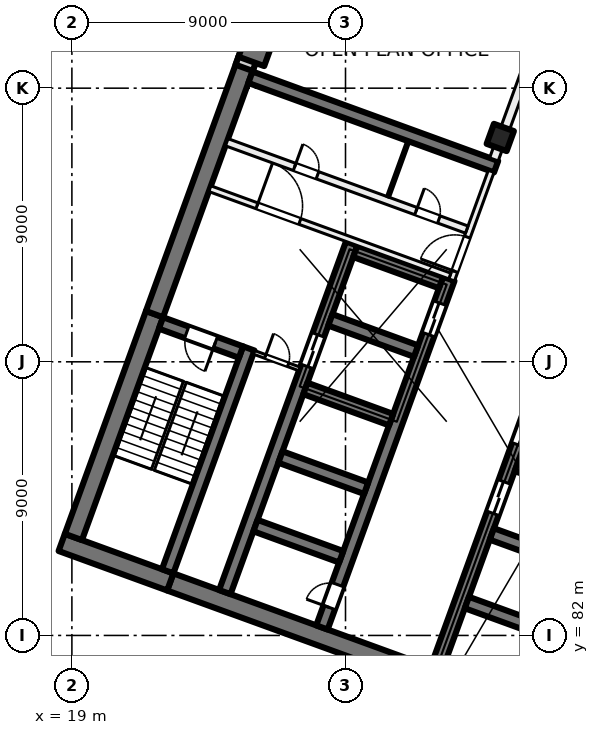
"""IFC4 building model, lengths in metres.
Left out: names, types, materials, properties, quantities, classifications, styles, units other than length and angle.
Written with IfcOpenShell. Run it as: python <this file> out.ifc"""

import sys

from ifc_helpers import new_model, si_unit, direction, frame, frame_2d, origin, origin_2d, place, context, subcontext, project, spatial, rectangle, extrude, element, fill, save


model = new_model("IFC4")
c1 = context("Model", 3, precision=1e-05, world=origin(), true_north=direction((0.0, 1.0)))
c2 = subcontext(c1, "Body", "Model", "MODEL_VIEW")
j1 = project(units=[si_unit("LENGTHUNIT", "METRE"), si_unit("PLANEANGLEUNIT", "RADIAN")], contexts=[c1])
p1 = place(None, origin())
s1 = spatial("IfcSite", under=j1, at=p1, CompositionType="ELEMENT")
p2 = place(p1, origin())
s2 = spatial("IfcBuilding", under=s1, at=p2, CompositionType="ELEMENT")
p3 = place(p2, frame((0.0, 0.0, 43.5)))
s3 = spatial("IfcBuildingStorey", under=s2, at=p3, CompositionType="ELEMENT", Elevation=43.5)
p4 = place(p3, frame((33.091, 98.379, 0.0), z_axis=(0.0, 0.0, 1.0), x_axis=(-0.342020143326, -0.939692620786, 0.0)))
e1 = element("IfcColumn", 1, at=p4, inside=s3, PredefinedType="COLUMN", context=c2, shape_type="SweptSolid", body=[
    extrude(rectangle(XDim=0.7, YDim=0.7, at=origin_2d()), origin(), (0.0, 0.0, 1.0), 4.0),
])
p5 = place(p3, frame((25.056, 101.303, 0.0), z_axis=(0.0, 0.0, 1.0), x_axis=(-0.342020143326, -0.939692620786, 0.0)))
e2 = element("IfcColumn", 2, at=p5, inside=s3, PredefinedType="COLUMN", context=c2, shape_type="SweptSolid", body=[
    extrude(rectangle(XDim=0.9, YDim=0.9, at=origin_2d()), origin(), (0.0, 0.0, 1.0), 4.0),
])
p6 = place(p3, frame((35.767, 78.835, 0.0), z_axis=(0.0, 0.0, 1.0), x_axis=(-0.939692894512, 0.342019391267, 0.0)))
e3 = element("IfcWall", 3, at=p6, inside=s3, PredefinedType="SHEAR", context=c2, shape_type="SweptSolid", body=[
    extrude(rectangle(XDim=14.4, YDim=0.6, at=frame_2d((7.2, 0.0))), origin(), (0.0, 0.0, 1.0), 4.0),
])
p7 = place(p3, frame((22.236, 83.76, 0.0), z_axis=(0.0, 0.0, 1.0), x_axis=(-0.939680822529, 0.342052557032, 0.0)))
e4 = element("IfcWall", 4, at=p7, inside=s3, PredefinedType="SHEAR", context=c2, shape_type="SweptSolid", body=[
    extrude(rectangle(XDim=3.8, YDim=0.6, at=frame_2d((1.9, 0.0))), origin(), (0.0, 0.0, 1.0), 4.0),
])
p8 = place(p3, frame((19.05, 85.239, 0.0), z_axis=(0.0, 0.0, 1.0), x_axis=(0.342016982193, 0.939693771338, 0.0)))
e5 = element("IfcWall", 5, at=p8, inside=s3, PredefinedType="SHEAR", context=c2, shape_type="SweptSolid", body=[
    extrude(rectangle(XDim=7.8, YDim=0.6, at=frame_2d((3.9, 0.0))), origin(), (0.0, 0.0, 1.0), 4.0),
])
p9 = place(p3, frame((21.717, 92.568, 0.0), z_axis=(0.0, 0.0, 1.0), x_axis=(0.342016162452, 0.939694069696, 0.0)))
e6 = element("IfcWall", 6, at=p9, inside=s3, PredefinedType="SHEAR", context=c2, shape_type="SweptSolid", body=[
    extrude(rectangle(XDim=8.9, YDim=0.6, at=frame_2d((4.45, 0.0))), origin(), (0.0, 0.0, 1.0), 4.0),
])
p10 = place(p3, frame((22.15, 84.11, 0.0), z_axis=(0.0, 0.0, 1.0), x_axis=(0.342016982193, 0.939693771338, 0.0)))
e7 = element("IfcWall", 7, at=p10, inside=s3, PredefinedType="SHEAR", context=c2, shape_type="SweptSolid", body=[
    extrude(rectangle(XDim=7.8, YDim=0.4, at=frame_2d((3.9, 0.0))), origin(), (0.0, 0.0, 1.0), 4.0),
])
p11 = place(p3, frame((24.562, 91.32, 0.0), z_axis=(0.0, 0.0, 1.0), x_axis=(-0.939717030584, 0.341953070509, 0.0)))
e8 = element("IfcWall", 8, at=p11, inside=s3, PredefinedType="SHEAR", context=c2, shape_type="SweptSolid", body=[
    extrude(rectangle(XDim=2.8, YDim=0.4, at=frame_2d((1.4, 0.0))), origin(), (0.0, 0.0, 1.0), 4.0),
])
p12 = place(p11, frame((0.9, 0.0, 0.0)))
e9 = element("IfcOpeningElement", 9, at=p12, cuts=e8, PredefinedType="OPENING", context=c2, shape_type="SweptSolid", body=[
    extrude(rectangle(XDim=1.0, YDim=2.1, at=frame_2d((0.5, 1.05))), frame((0.0, 0.21, 0.0), z_axis=(0.0, -1.0, 0.0), x_axis=(1.0, 0.0, 0.0)), (0.0, 0.0, 1.0), 0.42),
])
p13 = place(p3, frame((30.984, 80.895, 0.0), z_axis=(0.0, 0.0, 1.0), x_axis=(0.342021021735, 0.939692301071, 0.0)))
e10 = element("IfcWall", 10, at=p13, inside=s3, PredefinedType="SHEAR", context=c2, shape_type="SweptSolid", body=[
    extrude(rectangle(XDim=12.2, YDim=0.4, at=frame_2d((6.1, 0.0))), origin(), (0.0, 0.0, 1.0), 4.0),
])
p14 = place(p13, frame((5.45, 0.0, 0.0)))
e11 = element("IfcOpeningElement", 11, at=p14, cuts=e10, PredefinedType="OPENING", context=c2, shape_type="SweptSolid", body=[
    extrude(rectangle(XDim=1.1, YDim=2.1, at=frame_2d((0.55, 1.05))), frame((0.0, 0.21, 0.0), z_axis=(0.0, -1.0, 0.0), x_axis=(1.0, 0.0, 0.0)), (0.0, 0.0, 1.0), 0.42),
])
p15 = place(p13, frame((7.85, 0.0, 0.0)))
e12 = element("IfcOpeningElement", 12, at=p15, cuts=e10, PredefinedType="OPENING", context=c2, shape_type="SweptSolid", body=[
    extrude(rectangle(XDim=1.1, YDim=2.1, at=frame_2d((0.55, 1.05))), frame((0.0, 0.21, 0.0), z_axis=(0.0, -1.0, 0.0), x_axis=(1.0, 0.0, 0.0)), (0.0, 0.0, 1.0), 0.42),
])
p16 = place(p13, frame((10.25, 0.0, 0.0)))
e13 = element("IfcOpeningElement", 13, at=p16, cuts=e10, PredefinedType="OPENING", context=c2, shape_type="SweptSolid", body=[
    extrude(rectangle(XDim=1.1, YDim=2.1, at=frame_2d((0.55, 1.05))), frame((0.0, 0.21, 0.0), z_axis=(0.0, -1.0, 0.0), x_axis=(1.0, 0.0, 0.0)), (0.0, 0.0, 1.0), 0.42),
])
for number, where, z_axis, x_axis in (
    (14, (34.812, 82.056, 0.0), (0.0, 0.0, 1.0), (-0.94, 0.342, 0.0)),
    (15, (35.632, 84.311, 0.0), (0.0, 0.0, 1.0), (-0.94, 0.342, 0.0)),
    (16, (36.453, 86.566, 0.0), (0.0, 0.0, 1.0), (-0.94, 0.342, 0.0)),
):
    element("IfcWall", number, at=place(p3, frame(where, z_axis=z_axis, x_axis=x_axis)), inside=s3, PredefinedType="SHEAR", context=c2, shape_type="SweptSolid", body=[
        extrude(rectangle(XDim=3.0, YDim=0.4, at=frame_2d((1.5, 0.0))), origin(), (0.0, 0.0, 1.0), 4.0),
    ])
p17 = place(p3, frame((27.225, 82.263, 0.0), z_axis=(0.0, 0.0, 1.0), x_axis=(0.342014590177, 0.939694641948, 0.0)))
e17 = element("IfcWall", 17, at=p17, inside=s3, PredefinedType="SHEAR", context=c2, shape_type="SweptSolid", body=[
    extrude(rectangle(XDim=12.2, YDim=0.4, at=frame_2d((6.1, 0.0))), origin(), (0.0, 0.0, 1.0), 4.0),
])
p18 = place(p17, frame((10.25, 0.0, 0.0)))
e18 = element("IfcOpeningElement", 18, at=p18, cuts=e17, PredefinedType="OPENING", context=c2, shape_type="SweptSolid", body=[
    extrude(rectangle(XDim=1.1, YDim=2.1, at=frame_2d((0.55, 1.05))), frame((0.0, 0.21, 0.0), z_axis=(0.0, -1.0, 0.0), x_axis=(1.0, 0.0, 0.0)), (0.0, 0.0, 1.0), 0.42),
])
p19 = place(p17, frame((0.7, 0.0, 0.0)))
e19 = element("IfcOpeningElement", 19, at=p19, cuts=e17, PredefinedType="OPENING", context=c2, shape_type="SweptSolid", body=[
    extrude(rectangle(XDim=0.8, YDim=2.1, at=frame_2d((0.4, 1.05))), frame((0.0, 0.21, 0.0), z_axis=(0.0, -1.0, 0.0), x_axis=(1.0, 0.0, 0.0)), (0.0, 0.0, 1.0), 0.42),
])
p20 = place(p3, frame((24.03, 83.426, 0.0), z_axis=(0.0, 0.0, 1.0), x_axis=(0.342014590177, 0.939694641948, 0.0)))
e20 = element("IfcWall", 20, at=p20, inside=s3, PredefinedType="SHEAR", context=c2, shape_type="SweptSolid", body=[
    extrude(rectangle(XDim=12.2, YDim=0.4, at=frame_2d((6.1, 0.0))), origin(), (0.0, 0.0, 1.0), 4.0),
])
p21 = place(p20, frame((7.9, 0.0, 0.0)))
e21 = element("IfcOpeningElement", 21, at=p21, cuts=e20, PredefinedType="OPENING", context=c2, shape_type="SweptSolid", body=[
    extrude(rectangle(XDim=1.1, YDim=2.1, at=frame_2d((0.55, 1.05))), frame((0.0, 0.21, 0.0), z_axis=(0.0, -1.0, 0.0), x_axis=(1.0, 0.0, 0.0)), (0.0, 0.0, 1.0), 0.42),
])
p22 = place(p3, frame((27.858, 84.587, 0.0), z_axis=(0.0, 0.0, 1.0), x_axis=(-0.939686455819, 0.342037080957, 0.0)))
e22 = element("IfcWall", 22, at=p22, inside=s3, PredefinedType="SHEAR", context=c2, shape_type="SweptSolid", body=[
    extrude(rectangle(XDim=3.0, YDim=0.4, at=frame_2d((1.5, 0.0))), origin(), (0.0, 0.0, 1.0), 4.0),
])
p23 = place(p3, frame((28.678, 86.842, 0.0), z_axis=(0.0, 0.0, 1.0), x_axis=(-0.939676934218, 0.342063238742, 0.0)))
e23 = element("IfcWall", 23, at=p23, inside=s3, PredefinedType="SHEAR", context=c2, shape_type="SweptSolid", body=[
    extrude(rectangle(XDim=3.0, YDim=0.4, at=frame_2d((1.5, 0.0))), origin(), (0.0, 0.0, 1.0), 4.0),
])
for number, where, z_axis, x_axis in (
    (24, (29.5, 89.097, 0.0), (0.0, 0.0, 1.0), (-0.94, 0.342, 0.0)),
    (25, (30.32, 91.353, 0.0), (0.0, 0.0, 1.0), (-0.94, 0.342, 0.0)),
    (26, (31.141, 93.608, 0.0), (0.0, 0.0, 1.0), (-0.94, 0.342, 0.0)),
):
    element("IfcWall", number, at=place(p3, frame(where, z_axis=z_axis, x_axis=x_axis)), inside=s3, PredefinedType="SHEAR", context=c2, shape_type="SweptSolid", body=[
        extrude(rectangle(XDim=3.0, YDim=0.4, at=frame_2d((1.5, 0.0))), origin(), (0.0, 0.0, 1.0), 4.0),
    ])
p24 = place(p3, frame((32.953, 97.418, 0.0), z_axis=(0.0, 0.0, 1.0), x_axis=(-0.93969060187, 0.342025690201, 0.0)))
e27 = element("IfcWall", 27, at=p24, inside=s3, PredefinedType="SHEAR", context=c2, shape_type="SweptSolid", body=[
    extrude(rectangle(XDim=8.6, YDim=0.4, at=frame_2d((4.3, 0.0))), origin(), (0.0, 0.0, 1.0), 4.0),
])
p25 = place(p3, frame((24.666, 100.669, 0.0), z_axis=(0.0, 0.0, 1.0), x_axis=(0.34201964167, 0.939692803373, 0.0)))
e28 = element("IfcWall", 28, at=p25, inside=s3, PredefinedType="SOLIDWALL", context=c2, shape_type="SweptSolid", body=[
    extrude(rectangle(XDim=32.884, YDim=0.6, at=frame_2d((16.442, 0.0))), origin(), (0.0, 0.0, 1.0), 3.625),
])
p26 = place(p25, frame((1.48, 0.0, 0.9)))
e29 = element("IfcOpeningElement", 29, at=p26, cuts=e28, PredefinedType="OPENING", context=c2, shape_type="SweptSolid", body=[
    extrude(rectangle(XDim=3.0, YDim=2.4, at=frame_2d((1.5, 1.2))), frame((0.0, 0.31, 0.0), z_axis=(0.0, -1.0, 0.0), x_axis=(1.0, 0.0, 0.0)), (0.0, 0.0, 1.0), 0.62),
])
p27 = place(p25, frame((5.98, 0.0, 0.9)))
e30 = element("IfcOpeningElement", 30, at=p27, cuts=e28, PredefinedType="OPENING", context=c2, shape_type="SweptSolid", body=[
    extrude(rectangle(XDim=3.0, YDim=2.4, at=frame_2d((1.5, 1.2))), frame((0.0, 0.31, 0.0), z_axis=(0.0, -1.0, 0.0), x_axis=(1.0, 0.0, 0.0)), (0.0, 0.0, 1.0), 0.62),
])
p28 = place(p25, frame((10.48, 0.0, 0.9)))
e31 = element("IfcOpeningElement", 31, at=p28, cuts=e28, PredefinedType="OPENING", context=c2, shape_type="SweptSolid", body=[
    extrude(rectangle(XDim=3.0, YDim=2.4, at=frame_2d((1.5, 1.2))), frame((0.0, 0.31, 0.0), z_axis=(0.0, -1.0, 0.0), x_axis=(1.0, 0.0, 0.0)), (0.0, 0.0, 1.0), 0.62),
])
p29 = place(p25, frame((14.98, 0.0, 0.9)))
e32 = element("IfcOpeningElement", 32, at=p29, cuts=e28, PredefinedType="OPENING", context=c2, shape_type="SweptSolid", body=[
    extrude(rectangle(XDim=3.0, YDim=2.4, at=frame_2d((1.5, 1.2))), frame((0.0, 0.31, 0.0), z_axis=(0.0, -1.0, 0.0), x_axis=(1.0, 0.0, 0.0)), (0.0, 0.0, 1.0), 0.62),
])
p30 = place(p25, frame((20.08, 0.0, 0.0)))
e33 = element("IfcOpeningElement", 33, at=p30, cuts=e28, PredefinedType="OPENING", context=c2, shape_type="SweptSolid", body=[
    extrude(rectangle(XDim=1.8, YDim=2.4, at=frame_2d((0.9, 1.2))), frame((0.0, 0.31, 0.0), z_axis=(0.0, -1.0, 0.0), x_axis=(1.0, 0.0, 0.0)), (0.0, 0.0, 1.0), 0.62),
])
p31 = place(p25, frame((23.98, 0.0, 0.9)))
e34 = element("IfcOpeningElement", 34, at=p31, cuts=e28, PredefinedType="OPENING", context=c2, shape_type="SweptSolid", body=[
    extrude(rectangle(XDim=3.0, YDim=2.4, at=frame_2d((1.5, 1.2))), frame((0.0, 0.31, 0.0), z_axis=(0.0, -1.0, 0.0), x_axis=(1.0, 0.0, 0.0)), (0.0, 0.0, 1.0), 0.62),
])
p32 = place(p25, frame((28.48, 0.0, 0.9)))
e35 = element("IfcOpeningElement", 35, at=p32, cuts=e28, PredefinedType="OPENING", context=c2, shape_type="SweptSolid", body=[
    extrude(rectangle(XDim=3.0, YDim=2.4, at=frame_2d((1.5, 1.2))), frame((0.0, 0.31, 0.0), z_axis=(0.0, -1.0, 0.0), x_axis=(1.0, 0.0, 0.0)), (0.0, 0.0, 1.0), 0.62),
])
p33 = place(p3, frame((31.491, 93.693, 0.0), z_axis=(0.0, 0.0, 1.0), x_axis=(0.341995824804, 0.939701471648, 0.0)))
e36 = element("IfcWall", 36, at=p33, inside=s3, PredefinedType="PARTITIONING", context=c2, shape_type="SweptSolid", body=[
    extrude(rectangle(XDim=3.8, YDim=0.2, at=frame_2d((1.9, 0.0))), origin(), (0.0, 0.0, 1.0), 3.625),
])
p34 = place(p33, frame((0.3, 0.0, 0.0)))
e37 = element("IfcOpeningElement", 37, at=p34, cuts=e36, PredefinedType="OPENING", context=c2, shape_type="SweptSolid", body=[
    extrude(rectangle(XDim=1.2, YDim=2.1, at=frame_2d((0.6, 1.05))), frame((0.0, 0.11, 0.0), z_axis=(0.0, -1.0, 0.0), x_axis=(1.0, 0.0, 0.0)), (0.0, 0.0, 1.0), 0.22),
])
p35 = place(p3, frame((23.538, 96.694, 0.0), z_axis=(0.0, 0.0, 1.0), x_axis=(0.939691552312, -0.342023078919, 0.0)))
e38 = element("IfcWall", 38, at=p35, inside=s3, PredefinedType="PARTITIONING", context=c2, shape_type="SweptSolid", body=[
    extrude(rectangle(XDim=8.4, YDim=0.2, at=frame_2d((4.2, 0.0))), origin(), (0.0, 0.0, 1.0), 3.625),
])
p36 = place(p35, frame((1.65, 0.0, 0.0)))
e39 = element("IfcOpeningElement", 39, at=p36, cuts=e38, PredefinedType="OPENING", context=c2, shape_type="SweptSolid", body=[
    extrude(rectangle(XDim=1.5, YDim=2.1, at=frame_2d((0.75, 1.05))), frame((0.0, 0.11, 0.0), z_axis=(0.0, -1.0, 0.0), x_axis=(1.0, 0.0, 0.0)), (0.0, 0.0, 1.0), 0.22),
])
p37 = place(p3, frame((24.094, 98.221, 0.0), z_axis=(0.0, 0.0, 1.0), x_axis=(0.939691552312, -0.342023078919, 0.0)))
e40 = element("IfcWall", 40, at=p37, inside=s3, PredefinedType="PARTITIONING", context=c2, shape_type="SweptSolid", body=[
    extrude(rectangle(XDim=8.4, YDim=0.25, at=frame_2d((4.2, 0.0))), origin(), (0.0, 0.0, 1.0), 3.625),
])
p38 = place(p37, frame((6.625, 0.0, 0.0)))
e41 = element("IfcOpeningElement", 41, at=p38, cuts=e40, PredefinedType="OPENING", context=c2, shape_type="SweptSolid", body=[
    extrude(rectangle(XDim=0.8, YDim=2.1, at=frame_2d((0.4, 1.05))), frame((0.0, 0.135, 0.0), z_axis=(0.0, -1.0, 0.0), x_axis=(1.0, 0.0, 0.0)), (0.0, 0.0, 1.0), 0.27),
])
p39 = place(p37, frame((2.375, 0.0, 0.0)))
e42 = element("IfcOpeningElement", 42, at=p39, cuts=e40, PredefinedType="OPENING", context=c2, shape_type="SweptSolid", body=[
    extrude(rectangle(XDim=0.8, YDim=2.1, at=frame_2d((0.4, 1.05))), frame((0.0, 0.135, 0.0), z_axis=(0.0, -1.0, 0.0), x_axis=(1.0, 0.0, 0.0)), (0.0, 0.0, 1.0), 0.27),
])
p40 = place(p3, frame((24.985, 91.312, 0.0), z_axis=(0.0, 0.0, 1.0), x_axis=(0.939708740826, -0.341975850632, 0.0)))
e43 = element("IfcWall", 43, at=p40, inside=s3, PredefinedType="PARTITIONING", context=c2, shape_type="SweptSolid", body=[
    extrude(rectangle(XDim=1.6, YDim=0.125, at=frame_2d((0.8, 0.0))), origin(), (0.0, 0.0, 1.0), 3.625),
])
p41 = place(p40, frame((0.4, 0.0, 0.0)))
e44 = element("IfcOpeningElement", 44, at=p41, cuts=e43, PredefinedType="OPENING", context=c2, shape_type="SweptSolid", body=[
    extrude(rectangle(XDim=0.8, YDim=2.1, at=frame_2d((0.4, 1.05))), frame((0.0, 0.073, 0.0), z_axis=(0.0, -1.0, 0.0), x_axis=(1.0, 0.0, 0.0)), (0.0, 0.0, 1.0), 0.145),
])
p42 = place(p3, frame((29.399, 96.424, 0.0), z_axis=(0.0, 0.0, 1.0), x_axis=(0.341913947243, 0.939731266204, 0.0)))
e45 = element("IfcWall", 45, at=p42, inside=s3, PredefinedType="PARTITIONING", context=c2, shape_type="SweptSolid", body=[
    extrude(rectangle(XDim=1.95, YDim=0.1, at=frame_2d((0.975, 0.0))), origin(), (0.0, 0.0, 1.0), 3.625),
])
p43 = place(p3, frame((32.881, 97.657, 0.0), z_axis=(0.0, 0.0, 1.0), x_axis=(0.342017360004, 0.939693633828, 0.0)))
e46 = element("IfcWall", 46, at=p43, inside=s3, PredefinedType="PARTITIONING", context=c2, shape_type="SweptSolid", body=[
    extrude(rectangle(XDim=34.516, YDim=0.3, at=frame_2d((17.258, 0.0))), origin(), (0.0, 0.0, 1.0), 3.625),
])
p44 = place(p43, frame((12.975, 0.0, 0.0)))
e47 = element("IfcOpeningElement", 47, at=p44, cuts=e46, PredefinedType="OPENING", context=c2, shape_type="SweptSolid", body=[
    extrude(rectangle(XDim=1.8, YDim=2.1, at=frame_2d((0.9, 1.05))), frame((0.0, 0.16, 0.0), z_axis=(0.0, -1.0, 0.0), x_axis=(1.0, 0.0, 0.0)), (0.0, 0.0, 1.0), 0.32),
])
p45 = place(p18, origin())
e48 = element("IfcDoor", 48, at=p45, inside=s3, OperationType="DOUBLE_DOOR_SLIDING", PredefinedType="DOOR", context=c2, shape_type="SweptSolid", body=[
    extrude(rectangle(XDim=1.1, YDim=2.1, at=frame_2d((0.55, 1.05))), frame((0.0, 0.025, 0.0), z_axis=(0.0, -1.0, 0.0), x_axis=(1.0, 0.0, 0.0)), (0.0, 0.0, 1.0), 0.05),
])
fill(e18, e48)
p46 = place(p14, origin())
e49 = element("IfcDoor", 49, at=p46, inside=s3, OperationType="DOUBLE_DOOR_SLIDING", PredefinedType="DOOR", context=c2, shape_type="SweptSolid", body=[
    extrude(rectangle(XDim=1.1, YDim=2.1, at=frame_2d((0.55, 1.05))), frame((0.0, 0.025, 0.0), z_axis=(0.0, -1.0, 0.0), x_axis=(1.0, 0.0, 0.0)), (0.0, 0.0, 1.0), 0.05),
])
fill(e11, e49)
p47 = place(p15, origin())
e50 = element("IfcDoor", 50, at=p47, inside=s3, OperationType="DOUBLE_DOOR_SLIDING", PredefinedType="DOOR", context=c2, shape_type="SweptSolid", body=[
    extrude(rectangle(XDim=1.1, YDim=2.1, at=frame_2d((0.55, 1.05))), frame((0.0, 0.025, 0.0), z_axis=(0.0, -1.0, 0.0), x_axis=(1.0, 0.0, 0.0)), (0.0, 0.0, 1.0), 0.05),
])
fill(e12, e50)
p48 = place(p19, origin())
e51 = element("IfcDoor", 51, at=p48, inside=s3, OperationType="SINGLE_SWING_LEFT", PredefinedType="DOOR", context=c2, shape_type="SweptSolid", body=[
    extrude(rectangle(XDim=0.8, YDim=2.1, at=frame_2d((0.4, 1.05))), frame((0.0, 0.025, 0.0), z_axis=(0.0, -1.0, 0.0), x_axis=(1.0, 0.0, 0.0)), (0.0, 0.0, 1.0), 0.05),
])
fill(e19, e51)
p49 = place(p34, origin())
e52 = element("IfcDoor", 52, at=p49, inside=s3, OperationType="DOUBLE_DOOR_SINGLE_SWING", PredefinedType="DOOR", context=c2, shape_type="SweptSolid", body=[
    extrude(rectangle(XDim=1.2, YDim=2.1, at=frame_2d((0.6, 1.05))), frame((0.0, 0.025, 0.0), z_axis=(0.0, -1.0, 0.0), x_axis=(1.0, 0.0, 0.0)), (0.0, 0.0, 1.0), 0.05),
])
fill(e37, e52)
p50 = place(p36, origin())
e53 = element("IfcDoor", 53, at=p50, inside=s3, OperationType="DOUBLE_DOOR_SINGLE_SWING", PredefinedType="DOOR", context=c2, shape_type="SweptSolid", body=[
    extrude(rectangle(XDim=1.5, YDim=2.1, at=frame_2d((0.75, 1.05))), frame((0.0, 0.025, 0.0), z_axis=(0.0, -1.0, 0.0), x_axis=(1.0, 0.0, 0.0)), (0.0, 0.0, 1.0), 0.05),
])
fill(e39, e53)
p51 = place(p12, origin())
e54 = element("IfcDoor", 54, at=p51, inside=s3, OperationType="SINGLE_SWING_LEFT", PredefinedType="DOOR", context=c2, shape_type="SweptSolid", body=[
    extrude(rectangle(XDim=1.0, YDim=2.1, at=frame_2d((0.5, 1.05))), frame((0.0, 0.025, 0.0), z_axis=(0.0, -1.0, 0.0), x_axis=(1.0, 0.0, 0.0)), (0.0, 0.0, 1.0), 0.05),
])
fill(e9, e54)
p52 = place(p41, origin())
e55 = element("IfcDoor", 55, at=p52, inside=s3, OperationType="SINGLE_SWING_RIGHT", PredefinedType="DOOR", context=c2, shape_type="SweptSolid", body=[
    extrude(rectangle(XDim=0.8, YDim=2.1, at=frame_2d((0.4, 1.05))), frame((0.0, 0.025, 0.0), z_axis=(0.0, -1.0, 0.0), x_axis=(1.0, 0.0, 0.0)), (0.0, 0.0, 1.0), 0.05),
])
fill(e44, e55)
p53 = place(p38, origin())
e56 = element("IfcDoor", 56, at=p53, inside=s3, OperationType="SINGLE_SWING_LEFT", PredefinedType="DOOR", context=c2, shape_type="SweptSolid", body=[
    extrude(rectangle(XDim=0.8, YDim=2.1, at=frame_2d((0.4, 1.05))), frame((0.0, 0.025, 0.0), z_axis=(0.0, -1.0, 0.0), x_axis=(1.0, 0.0, 0.0)), (0.0, 0.0, 1.0), 0.05),
])
fill(e41, e56)
p54 = place(p39, origin())
e57 = element("IfcDoor", 57, at=p54, inside=s3, OperationType="SINGLE_SWING_RIGHT", PredefinedType="DOOR", context=c2, shape_type="SweptSolid", body=[
    extrude(rectangle(XDim=0.8, YDim=2.1, at=frame_2d((0.4, 1.05))), frame((0.0, 0.025, 0.0), z_axis=(0.0, -1.0, 0.0), x_axis=(1.0, 0.0, 0.0)), (0.0, 0.0, 1.0), 0.05),
])
fill(e42, e57)
p55 = place(p21, origin())
e58 = element("IfcDoor", 58, at=p55, inside=s3, OperationType="DOUBLE_DOOR_SLIDING", PredefinedType="DOOR", context=c2, shape_type="SweptSolid", body=[
    extrude(rectangle(XDim=1.1, YDim=2.1, at=frame_2d((0.55, 1.05))), frame((0.0, 0.025, 0.0), z_axis=(0.0, -1.0, 0.0), x_axis=(1.0, 0.0, 0.0)), (0.0, 0.0, 1.0), 0.05),
])
fill(e21, e58)
save(model, sys.argv[1])
